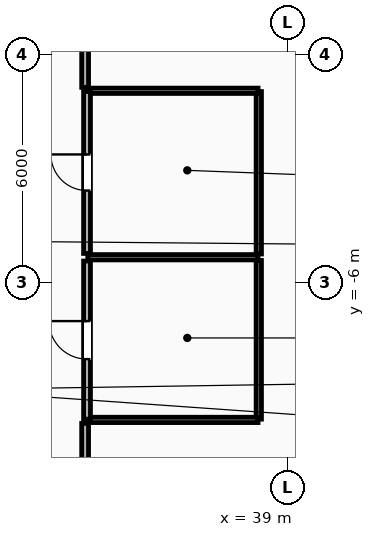
"""IFC4 building model, lengths in metres.
Left out: names, types, materials, properties, quantities, classifications, styles, units other than length and angle.
Written with IfcOpenShell. Run it as: python <this file> out.ifc"""

import sys

from ifc_helpers import new_model, si_unit, direction, frame, frame_2d, origin, place, context, subcontext, project, spatial, rectangle, extrude, element, fill, save


model = new_model("IFC4")
c1 = context("Model", 3, precision=1e-05, world=origin(), true_north=direction((0.0, 1.0)))
c2 = subcontext(c1, "Body", "Model", "MODEL_VIEW")
j1 = project(units=[si_unit("LENGTHUNIT", "METRE"), si_unit("PLANEANGLEUNIT", "RADIAN")], contexts=[c1])
p1 = place(None, origin())
s1 = spatial("IfcSite", under=j1, at=p1, CompositionType="ELEMENT")
p2 = place(p1, origin())
s2 = spatial("IfcBuilding", under=s1, at=p2, CompositionType="ELEMENT")
p3 = place(p2, frame((0.0, 0.0, 125.0)))
s3 = spatial("IfcBuildingStorey", under=s2, at=p3, CompositionType="ELEMENT", Elevation=125.0)
p4 = place(p3, frame((38.24, -9.59, 0.0), z_axis=(0.0, 0.0, 1.0), x_axis=(0.0, 1.0, 0.0)))
e1 = element("IfcWall", 1, at=p4, inside=s3, PredefinedType="PARTITIONING", context=c2, shape_type="SweptSolid", body=[
    extrude(rectangle(XDim=4.175, YDim=0.14, at=frame_2d((2.087, 0.0))), origin(), (0.0, 0.0, 1.0), 3.3),
])
p5 = place(p3, frame((38.24, -5.245, 0.0), z_axis=(0.0, 0.0, 1.0), x_axis=(0.0, 1.0, 0.0)))
e2 = element("IfcWall", 2, at=p5, inside=s3, PredefinedType="PARTITIONING", context=c2, shape_type="SweptSolid", body=[
    extrude(rectangle(XDim=4.275, YDim=0.14, at=frame_2d((2.138, 0.0))), origin(), (0.0, 0.0, 1.0), 3.3),
])
for number, where, z_axis, x_axis in (
    (3, (33.74, -0.95, 0.0), (0.0, 0.0, 1.0), (1.0, 0.0, 0.0)),
    (4, (33.74, -5.33, 0.0), (0.0, 0.0, 1.0), (1.0, 0.0, 0.0)),
    (5, (33.74, -9.61, 0.0), (0.0, 0.0, 1.0), (1.0, 0.0, 0.0)),
):
    element("IfcWall", number, at=place(p3, frame(where, z_axis=z_axis, x_axis=x_axis)), inside=s3, PredefinedType="PARTITIONING", context=c2, shape_type="SweptSolid", body=[
        extrude(rectangle(XDim=4.48, YDim=0.14, at=frame_2d((2.24, 0.0))), origin(), (0.0, 0.0, 1.0), 3.3),
    ])
p6 = place(p3, frame((33.72, -5.23, 0.0), z_axis=(0.0, 0.0, 1.0), x_axis=(0.0, 1.0, 0.0)))
e6 = element("IfcWall", 6, at=p6, inside=s3, PredefinedType="PARTITIONING", context=c2, shape_type="SweptSolid", body=[
    extrude(rectangle(XDim=4.26, YDim=0.18, at=frame_2d((2.13, 0.0))), origin(), (0.0, 0.0, 1.0), 3.3),
])
p7 = place(p6, frame((1.655, 0.0, 0.0)))
e7 = element("IfcOpeningElement", 7, at=p7, cuts=e6, PredefinedType="OPENING", context=c2, shape_type="SweptSolid", body=[
    extrude(rectangle(XDim=0.95, YDim=2.1, at=frame_2d((0.475, 1.05))), frame((0.0, 0.1, 0.0), z_axis=(0.0, -1.0, 0.0), x_axis=(1.0, 0.0, 0.0)), (0.0, 0.0, 1.0), 0.2),
])
p8 = place(p3, frame((33.72, -9.59, 0.0), z_axis=(0.0, 0.0, 1.0), x_axis=(0.0, 1.0, 0.0)))
e8 = element("IfcWall", 8, at=p8, inside=s3, PredefinedType="PARTITIONING", context=c2, shape_type="SweptSolid", body=[
    extrude(rectangle(XDim=4.16, YDim=0.18, at=frame_2d((2.08, 0.0))), origin(), (0.0, 0.0, 1.0), 3.3),
])
p9 = place(p8, frame((1.58, 0.0, 0.0)))
e9 = element("IfcOpeningElement", 9, at=p9, cuts=e8, PredefinedType="OPENING", context=c2, shape_type="SweptSolid", body=[
    extrude(rectangle(XDim=1.0, YDim=2.15, at=frame_2d((0.5, 1.075))), frame((0.0, 0.1, 0.0), z_axis=(0.0, -1.0, 0.0), x_axis=(1.0, 0.0, 0.0)), (0.0, 0.0, 1.0), 0.2),
])
p10 = place(p3, frame((33.67, -0.859, 0.0), z_axis=(0.0, 0.0, 1.0), x_axis=(0.0, 1.0, 0.0)))
e10 = element("IfcWall", 10, at=p10, inside=s3, PredefinedType="PARTITIONING", context=c2, shape_type="SweptSolid", body=[
    extrude(rectangle(XDim=12.259, YDim=0.18, at=frame_2d((6.129, 0.0))), origin(), (0.0, 0.0, 1.0), 3.3),
])
p11 = place(p3, frame((33.67, -17.428, 0.0), z_axis=(0.0, 0.0, 1.0), x_axis=(0.0, 1.0, 0.0)))
e11 = element("IfcWall", 11, at=p11, inside=s3, PredefinedType="PARTITIONING", context=c2, shape_type="SweptSolid", body=[
    extrude(rectangle(XDim=7.727, YDim=0.18, at=frame_2d((3.864, 0.0))), origin(), (0.0, 0.0, 1.0), 3.3),
])
p12 = place(p7, origin())
e12 = element("IfcDoor", 12, at=p12, inside=s3, OperationType="SINGLE_SWING_RIGHT", PredefinedType="DOOR", context=c2, shape_type="SweptSolid", body=[
    extrude(rectangle(XDim=0.95, YDim=2.1, at=frame_2d((0.475, 1.05))), frame((0.0, 0.025, 0.0), z_axis=(0.0, -1.0, 0.0), x_axis=(1.0, 0.0, 0.0)), (0.0, 0.0, 1.0), 0.05),
])
fill(e7, e12)
p13 = place(p9, origin())
e13 = element("IfcDoor", 13, at=p13, inside=s3, OperationType="SINGLE_SWING_RIGHT", PredefinedType="DOOR", context=c2, shape_type="SweptSolid", body=[
    extrude(rectangle(XDim=1.0, YDim=2.15, at=frame_2d((0.5, 1.075))), frame((0.0, 0.025, 0.0), z_axis=(0.0, -1.0, 0.0), x_axis=(1.0, 0.0, 0.0)), (0.0, 0.0, 1.0), 0.05),
])
fill(e9, e13)
save(model, sys.argv[1])
